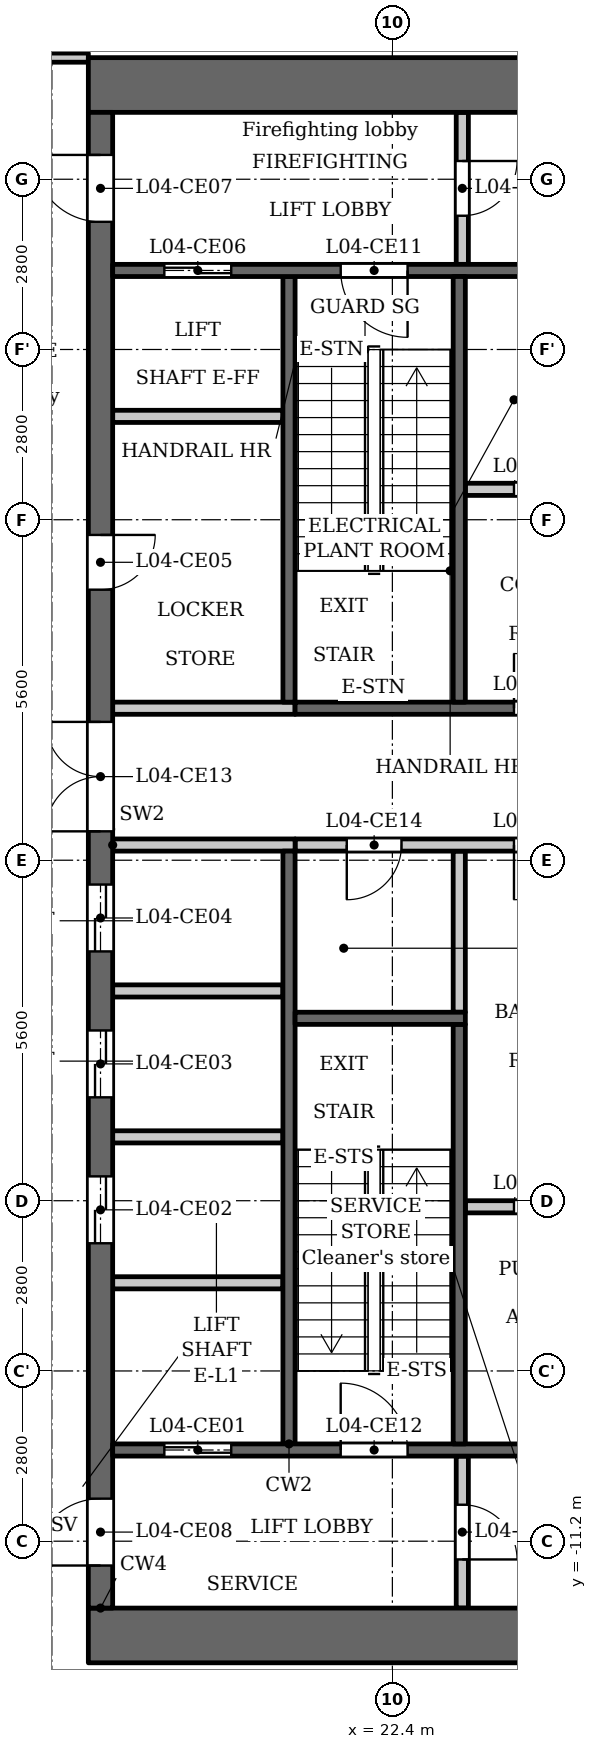
"""IFC4 building model, lengths in metres.
Left out: names, types, materials, properties, quantities, classifications, styles, units other than length and angle.
Written with IfcOpenShell. Run it as: python <this file> out.ifc"""

import sys

from ifc_helpers import new_model, si_unit, direction, frame, frame_2d, origin, place, context, subcontext, project, spatial, rectangle, extrude, element, fill, save


model = new_model("IFC4")
c1 = context("Model", 3, precision=1e-05, world=origin(), true_north=direction((0.0, 1.0)))
c2 = subcontext(c1, "Body", "Model", "MODEL_VIEW")
j1 = project(units=[si_unit("LENGTHUNIT", "METRE"), si_unit("PLANEANGLEUNIT", "RADIAN")], contexts=[c1])
p1 = place(None, origin())
s1 = spatial("IfcSite", under=j1, at=p1, CompositionType="ELEMENT")
p2 = place(p1, origin())
s2 = spatial("IfcBuilding", under=s1, at=p2, CompositionType="ELEMENT")
p3 = place(p2, frame((0.0, 0.0, 20.9)))
s3 = spatial("IfcBuildingStorey", under=s2, at=p3, CompositionType="ELEMENT", Elevation=20.9)
p4 = place(p3, frame((23.5, -2.5, 0.0), z_axis=(0.0, 0.0, 1.0), x_axis=(0.0, 1.0, 0.0)))
e1 = element("IfcWall", 1, at=p4, inside=s3, PredefinedType="PARTITIONING", context=c2, shape_type="SweptSolid", body=[
    extrude(rectangle(XDim=2.65, YDim=0.2, at=frame_2d((1.325, 0.0))), origin(), (0.0, 0.0, 1.0), 4.45),
])
p5 = place(p3, frame((20.7, 2.6, 0.0), z_axis=(0.0, 0.0, 1.0), x_axis=(0.0, 1.0, 0.0)))
e2 = element("IfcWall", 2, at=p5, inside=s3, PredefinedType="SHEAR", context=c2, shape_type="SweptSolid", body=[
    extrude(rectangle(XDim=7.0, YDim=0.2, at=frame_2d((3.5, 0.0))), origin(), (0.0, 0.0, 1.0), 4.45),
])
p6 = place(p3, frame((20.7, -9.6, 0.0), z_axis=(0.0, 0.0, 1.0), x_axis=(0.0, 1.0, 0.0)))
e3 = element("IfcWall", 3, at=p6, inside=s3, PredefinedType="SHEAR", context=c2, shape_type="SweptSolid", body=[
    extrude(rectangle(XDim=9.75, YDim=0.2, at=frame_2d((4.875, 0.0))), origin(), (0.0, 0.0, 1.0), 4.45),
])
p7 = place(p3, frame((20.8, 2.5, 0.0), z_axis=(0.0, 0.0, 1.0), x_axis=(1.0, 0.0, 0.0)))
e4 = element("IfcWall", 4, at=p7, inside=s3, PredefinedType="SHEAR", context=c2, shape_type="SweptSolid", body=[
    extrude(rectangle(XDim=5.3, YDim=0.2, at=frame_2d((2.65, 0.0))), origin(), (0.0, 0.0, 1.0), 4.45),
])
p8 = place(p7, frame((3.6, 0.0, 0.0)))
e5 = element("IfcOpeningElement", 5, at=p8, cuts=e4, PredefinedType="OPENING", context=c2, shape_type="SweptSolid", body=[
    extrude(rectangle(XDim=0.9, YDim=2.1, at=frame_2d((0.45, 1.05))), frame((0.0, 0.11, 0.0), z_axis=(0.0, -1.0, 0.0), x_axis=(1.0, 0.0, 0.0)), (0.0, 0.0, 1.0), 0.22),
])
p9 = place(p3, frame((20.8, 0.25, 0.0), z_axis=(0.0, 0.0, 1.0), x_axis=(1.0, 0.0, 0.0)))
e6 = element("IfcWall", 6, at=p9, inside=s3, PredefinedType="PARTITIONING", context=c2, shape_type="SweptSolid", body=[
    extrude(rectangle(XDim=5.3, YDim=0.2, at=frame_2d((2.65, 0.0))), origin(), (0.0, 0.0, 1.0), 4.45),
])
p10 = place(p9, frame((0.85, 0.0, 0.0)))
e7 = element("IfcOpeningElement", 7, at=p10, cuts=e6, PredefinedType="OPENING", context=c2, shape_type="SweptSolid", body=[
    extrude(rectangle(XDim=0.9, YDim=2.1, at=frame_2d((0.45, 1.05))), frame((0.0, 0.11, 0.0), z_axis=(0.0, -1.0, 0.0), x_axis=(1.0, 0.0, 0.0)), (0.0, 0.0, 1.0), 0.22),
])
p11 = place(p9, frame((3.6, 0.0, 0.0)))
e8 = element("IfcOpeningElement", 8, at=p11, cuts=e6, PredefinedType="OPENING", context=c2, shape_type="SweptSolid", body=[
    extrude(rectangle(XDim=0.9, YDim=2.1, at=frame_2d((0.45, 1.05))), frame((0.0, 0.11, 0.0), z_axis=(0.0, -1.0, 0.0), x_axis=(1.0, 0.0, 0.0)), (0.0, 0.0, 1.0), 0.22),
])
for number, where, z_axis, x_axis in (
    (9, (17.4, 12.75, 0.0), (0.0, 0.0, 1.0), (1.0, 0.0, 0.0)),
    (10, (17.4, -12.75, 0.0), (0.0, 0.0, 1.0), (1.0, 0.0, 0.0)),
):
    element("IfcWall", number, at=place(p3, frame(where, z_axis=z_axis, x_axis=x_axis)), inside=s3, PredefinedType="SHEAR", context=c2, shape_type="SweptSolid", body=[
        extrude(rectangle(XDim=10.4, YDim=0.9, at=frame_2d((5.2, 0.0))), origin(), (0.0, 0.0, 1.0), 4.45),
    ])
p12 = place(p3, frame((17.6, -12.3, 0.0), z_axis=(0.0, 0.0, 1.0), x_axis=(0.0, 1.0, 0.0)))
e11 = element("IfcWall", 11, at=p12, inside=s3, PredefinedType="SHEAR", context=c2, shape_type="SweptSolid", body=[
    extrude(rectangle(XDim=24.6, YDim=0.4, at=frame_2d((12.3, 0.0))), origin(), (0.0, 0.0, 1.0), 4.45),
])
p13 = place(p12, frame((6.0, 0.0, 0.0)))
e12 = element("IfcOpeningElement", 12, at=p13, cuts=e11, PredefinedType="OPENING", context=c2, shape_type="SweptSolid", body=[
    extrude(rectangle(XDim=1.1, YDim=2.1, at=frame_2d((0.55, 1.05))), frame((0.0, 0.21, 0.0), z_axis=(0.0, -1.0, 0.0), x_axis=(1.0, 0.0, 0.0)), (0.0, 0.0, 1.0), 0.42),
])
p14 = place(p12, frame((8.4, 0.0, 0.0)))
e13 = element("IfcOpeningElement", 13, at=p14, cuts=e11, PredefinedType="OPENING", context=c2, shape_type="SweptSolid", body=[
    extrude(rectangle(XDim=1.1, YDim=2.1, at=frame_2d((0.55, 1.05))), frame((0.0, 0.21, 0.0), z_axis=(0.0, -1.0, 0.0), x_axis=(1.0, 0.0, 0.0)), (0.0, 0.0, 1.0), 0.42),
])
p15 = place(p12, frame((10.8, 0.0, 0.0)))
e14 = element("IfcOpeningElement", 14, at=p15, cuts=e11, PredefinedType="OPENING", context=c2, shape_type="SweptSolid", body=[
    extrude(rectangle(XDim=1.1, YDim=2.1, at=frame_2d((0.55, 1.05))), frame((0.0, 0.21, 0.0), z_axis=(0.0, -1.0, 0.0), x_axis=(1.0, 0.0, 0.0)), (0.0, 0.0, 1.0), 0.42),
])
p16 = place(p12, frame((16.75, 0.0, 0.0)))
e15 = element("IfcOpeningElement", 15, at=p16, cuts=e11, PredefinedType="OPENING", context=c2, shape_type="SweptSolid", body=[
    extrude(rectangle(XDim=0.9, YDim=2.1, at=frame_2d((0.45, 1.05))), frame((0.0, 0.21, 0.0), z_axis=(0.0, -1.0, 0.0), x_axis=(1.0, 0.0, 0.0)), (0.0, 0.0, 1.0), 0.42),
])
p17 = place(p12, frame((22.8, 0.0, 0.0)))
e16 = element("IfcOpeningElement", 16, at=p17, cuts=e11, PredefinedType="OPENING", context=c2, shape_type="SweptSolid", body=[
    extrude(rectangle(XDim=1.1, YDim=2.1, at=frame_2d((0.55, 1.05))), frame((0.0, 0.21, 0.0), z_axis=(0.0, -1.0, 0.0), x_axis=(1.0, 0.0, 0.0)), (0.0, 0.0, 1.0), 0.42),
])
p18 = place(p12, frame((0.7, 0.0, 0.0)))
e17 = element("IfcOpeningElement", 17, at=p18, cuts=e11, PredefinedType="OPENING", context=c2, shape_type="SweptSolid", body=[
    extrude(rectangle(XDim=1.1, YDim=2.1, at=frame_2d((0.55, 1.05))), frame((0.0, 0.21, 0.0), z_axis=(0.0, -1.0, 0.0), x_axis=(1.0, 0.0, 0.0)), (0.0, 0.0, 1.0), 0.42),
])
p19 = place(p12, frame((12.775, 0.0, 0.0)))
e18 = element("IfcOpeningElement", 18, at=p19, cuts=e11, PredefinedType="OPENING", context=c2, shape_type="SweptSolid", body=[
    extrude(rectangle(XDim=1.8, YDim=2.1, at=frame_2d((0.9, 1.05))), frame((0.0, 0.21, 0.0), z_axis=(0.0, -1.0, 0.0), x_axis=(1.0, 0.0, 0.0)), (0.0, 0.0, 1.0), 0.42),
])
p20 = place(p3, frame((23.55, 9.8, 0.0), z_axis=(0.0, 0.0, 1.0), x_axis=(0.0, 1.0, 0.0)))
e19 = element("IfcWall", 19, at=p20, inside=s3, PredefinedType="PARTITIONING", context=c2, shape_type="SweptSolid", body=[
    extrude(rectangle(XDim=2.5, YDim=0.2, at=frame_2d((1.25, 0.0))), origin(), (0.0, 0.0, 1.0), 4.45),
])
p21 = place(p20, frame((0.8, 0.0, 0.0)))
e20 = element("IfcOpeningElement", 20, at=p21, cuts=e19, PredefinedType="OPENING", context=c2, shape_type="SweptSolid", body=[
    extrude(rectangle(XDim=0.9, YDim=2.1, at=frame_2d((0.45, 1.05))), frame((0.0, 0.11, 0.0), z_axis=(0.0, -1.0, 0.0), x_axis=(1.0, 0.0, 0.0)), (0.0, 0.0, 1.0), 0.22),
])
p22 = place(p3, frame((23.55, -12.3, 0.0), z_axis=(0.0, 0.0, 1.0), x_axis=(0.0, 1.0, 0.0)))
e21 = element("IfcWall", 21, at=p22, inside=s3, PredefinedType="PARTITIONING", context=c2, shape_type="SweptSolid", body=[
    extrude(rectangle(XDim=2.5, YDim=0.2, at=frame_2d((1.25, 0.0))), origin(), (0.0, 0.0, 1.0), 4.45),
])
p23 = place(p22, frame((0.8, 0.0, 0.0)))
e22 = element("IfcOpeningElement", 22, at=p23, cuts=e21, PredefinedType="OPENING", context=c2, shape_type="SweptSolid", body=[
    extrude(rectangle(XDim=0.9, YDim=2.1, at=frame_2d((0.45, 1.05))), frame((0.0, 0.11, 0.0), z_axis=(0.0, -1.0, 0.0), x_axis=(1.0, 0.0, 0.0)), (0.0, 0.0, 1.0), 0.22),
])
p24 = place(p3, frame((23.6, -5.7, 0.0), z_axis=(0.0, 0.0, 1.0), x_axis=(1.0, 0.0, 0.0)))
e23 = element("IfcWall", 23, at=p24, inside=s3, PredefinedType="PARTITIONING", context=c2, shape_type="SweptSolid", body=[
    extrude(rectangle(XDim=2.5, YDim=0.2, at=frame_2d((1.25, 0.0))), origin(), (0.0, 0.0, 1.0), 4.45),
])
p25 = place(p24, frame((0.8, 0.0, 0.0)))
e24 = element("IfcOpeningElement", 24, at=p25, cuts=e23, PredefinedType="OPENING", context=c2, shape_type="SweptSolid", body=[
    extrude(rectangle(XDim=0.9, YDim=2.1, at=frame_2d((0.45, 1.05))), frame((0.0, 0.11, 0.0), z_axis=(0.0, -1.0, 0.0), x_axis=(1.0, 0.0, 0.0)), (0.0, 0.0, 1.0), 0.22),
])
p26 = place(p3, frame((23.6, 6.1, 0.0), z_axis=(0.0, 0.0, 1.0), x_axis=(1.0, 0.0, 0.0)))
e25 = element("IfcWall", 25, at=p26, inside=s3, PredefinedType="PARTITIONING", context=c2, shape_type="SweptSolid", body=[
    extrude(rectangle(XDim=2.5, YDim=0.2, at=frame_2d((1.25, 0.0))), origin(), (0.0, 0.0, 1.0), 4.45),
])
p27 = place(p26, frame((0.8, 0.0, 0.0)))
e26 = element("IfcOpeningElement", 26, at=p27, cuts=e25, PredefinedType="OPENING", context=c2, shape_type="SweptSolid", body=[
    extrude(rectangle(XDim=0.9, YDim=2.1, at=frame_2d((0.45, 1.05))), frame((0.0, 0.11, 0.0), z_axis=(0.0, -1.0, 0.0), x_axis=(1.0, 0.0, 0.0)), (0.0, 0.0, 1.0), 0.22),
])
p28 = place(p3, frame((17.8, -9.7, 0.0), z_axis=(0.0, 0.0, 1.0), x_axis=(1.0, 0.0, 0.0)))
e27 = element("IfcWall", 27, at=p28, inside=s3, PredefinedType="SHEAR", context=c2, shape_type="SweptSolid", body=[
    extrude(rectangle(XDim=8.3, YDim=0.2, at=frame_2d((4.15, 0.0))), origin(), (0.0, 0.0, 1.0), 4.45),
])
p29 = place(p28, frame((0.85, 0.0, 0.0)))
e28 = element("IfcOpeningElement", 28, at=p29, cuts=e27, PredefinedType="OPENING", context=c2, shape_type="SweptSolid", body=[
    extrude(rectangle(XDim=1.1, YDim=2.1, at=frame_2d((0.55, 1.05))), frame((0.0, 0.11, 0.0), z_axis=(0.0, -1.0, 0.0), x_axis=(1.0, 0.0, 0.0)), (0.0, 0.0, 1.0), 0.22),
])
p30 = place(p28, frame((3.75, 0.0, 0.0)))
e29 = element("IfcOpeningElement", 29, at=p30, cuts=e27, PredefinedType="OPENING", context=c2, shape_type="SweptSolid", body=[
    extrude(rectangle(XDim=1.1, YDim=2.1, at=frame_2d((0.55, 1.05))), frame((0.0, 0.11, 0.0), z_axis=(0.0, -1.0, 0.0), x_axis=(1.0, 0.0, 0.0)), (0.0, 0.0, 1.0), 0.22),
])
for number, where, z_axis, x_axis in (
    (30, (17.8, -6.95, 0.0), (0.0, 0.0, 1.0), (1.0, 0.0, 0.0)),
    (31, (17.8, -4.55, 0.0), (0.0, 0.0, 1.0), (1.0, 0.0, 0.0)),
    (32, (17.8, -2.15, 0.0), (0.0, 0.0, 1.0), (1.0, 0.0, 0.0)),
):
    element("IfcWall", number, at=place(p3, frame(where, z_axis=z_axis, x_axis=x_axis)), inside=s3, PredefinedType="PARTITIONING", context=c2, shape_type="SweptSolid", body=[
        extrude(rectangle(XDim=2.8, YDim=0.2, at=frame_2d((1.4, 0.0))), origin(), (0.0, 0.0, 1.0), 4.45),
    ])
for number, where, z_axis, x_axis in (
    (33, (17.8, 0.25, 0.0), (0.0, 0.0, 1.0), (1.0, 0.0, 0.0)),
    (34, (17.8, 2.5, 0.0), (0.0, 0.0, 1.0), (1.0, 0.0, 0.0)),
):
    element("IfcWall", number, at=place(p3, frame(where, z_axis=z_axis, x_axis=x_axis)), inside=s3, PredefinedType="PARTITIONING", context=c2, shape_type="SweptSolid", body=[
        extrude(rectangle(XDim=3.0, YDim=0.2, at=frame_2d((1.5, 0.0))), origin(), (0.0, 0.0, 1.0), 4.45),
    ])
p31 = place(p3, frame((17.8, 7.3, 0.0), z_axis=(0.0, 0.0, 1.0), x_axis=(1.0, 0.0, 0.0)))
e35 = element("IfcWall", 35, at=p31, inside=s3, PredefinedType="PARTITIONING", context=c2, shape_type="SweptSolid", body=[
    extrude(rectangle(XDim=2.8, YDim=0.2, at=frame_2d((1.4, 0.0))), origin(), (0.0, 0.0, 1.0), 4.45),
])
p32 = place(p3, frame((17.8, 9.7, 0.0), z_axis=(0.0, 0.0, 1.0), x_axis=(1.0, 0.0, 0.0)))
e36 = element("IfcWall", 36, at=p32, inside=s3, PredefinedType="SHEAR", context=c2, shape_type="SweptSolid", body=[
    extrude(rectangle(XDim=8.3, YDim=0.2, at=frame_2d((4.15, 0.0))), origin(), (0.0, 0.0, 1.0), 4.45),
])
p33 = place(p32, frame((0.85, 0.0, 0.0)))
e37 = element("IfcOpeningElement", 37, at=p33, cuts=e36, PredefinedType="OPENING", context=c2, shape_type="SweptSolid", body=[
    extrude(rectangle(XDim=1.1, YDim=2.1, at=frame_2d((0.55, 1.05))), frame((0.0, 0.11, 0.0), z_axis=(0.0, -1.0, 0.0), x_axis=(1.0, 0.0, 0.0)), (0.0, 0.0, 1.0), 0.22),
])
p34 = place(p32, frame((3.75, 0.0, 0.0)))
e38 = element("IfcOpeningElement", 38, at=p34, cuts=e36, PredefinedType="OPENING", context=c2, shape_type="SweptSolid", body=[
    extrude(rectangle(XDim=1.1, YDim=2.1, at=frame_2d((0.55, 1.05))), frame((0.0, 0.11, 0.0), z_axis=(0.0, -1.0, 0.0), x_axis=(1.0, 0.0, 0.0)), (0.0, 0.0, 1.0), 0.22),
])
p35 = place(p3, frame((23.5, 2.6, 0.0), z_axis=(0.0, 0.0, 1.0), x_axis=(0.0, 1.0, 0.0)))
e39 = element("IfcWall", 39, at=p35, inside=s3, PredefinedType="SHEAR", context=c2, shape_type="SweptSolid", body=[
    extrude(rectangle(XDim=7.0, YDim=0.2, at=frame_2d((3.5, 0.0))), origin(), (0.0, 0.0, 1.0), 4.45),
])
p36 = place(p3, frame((23.5, -9.6, 0.0), z_axis=(0.0, 0.0, 1.0), x_axis=(0.0, 1.0, 0.0)))
e40 = element("IfcWall", 40, at=p36, inside=s3, PredefinedType="SHEAR", context=c2, shape_type="SweptSolid", body=[
    extrude(rectangle(XDim=6.9, YDim=0.2, at=frame_2d((3.45, 0.0))), origin(), (0.0, 0.0, 1.0), 4.45),
])
p37 = place(p3, frame((20.8, -2.6, 0.0), z_axis=(0.0, 0.0, 1.0), x_axis=(1.0, 0.0, 0.0)))
e41 = element("IfcWall", 41, at=p37, inside=s3, PredefinedType="SHEAR", context=c2, shape_type="SweptSolid", body=[
    extrude(rectangle(XDim=2.8, YDim=0.2, at=frame_2d((1.4, 0.0))), origin(), (0.0, 0.0, 1.0), 4.45),
])
p38 = place(p3, frame((-17.4, 13.2, 0.0), z_axis=(0.0, 0.0, 1.0), x_axis=(1.0, 0.0, 0.0)))
e42 = element("IfcWall", 42, at=p38, inside=s3, PredefinedType="PARTITIONING", context=c2, shape_type="SweptSolid", body=[
    extrude(rectangle(XDim=34.8, YDim=0.15, at=frame_2d((17.4, 0.0))), origin(), (0.0, 0.0, 1.0), 4.45),
])
p39 = place(p38, frame((3.05, 0.0, 0.0)))
e43 = element("IfcOpeningElement", 43, at=p39, cuts=e42, PredefinedType="OPENING", context=c2, shape_type="SweptSolid", body=[
    extrude(rectangle(XDim=1.8, YDim=2.1, at=frame_2d((0.9, 1.05))), frame((0.0, 0.085, 0.0), z_axis=(0.0, -1.0, 0.0), x_axis=(1.0, 0.0, 0.0)), (0.0, 0.0, 1.0), 0.17),
])
p40 = place(p38, frame((0.75, 0.0, 0.0)))
e44 = element("IfcOpeningElement", 44, at=p40, cuts=e42, PredefinedType="OPENING", context=c2, shape_type="SweptSolid", body=[
    extrude(rectangle(XDim=1.0, YDim=2.1, at=frame_2d((0.5, 1.05))), frame((0.0, 0.085, 0.0), z_axis=(0.0, -1.0, 0.0), x_axis=(1.0, 0.0, 0.0)), (0.0, 0.0, 1.0), 0.17),
])
p41 = place(p38, frame((33.15, 0.0, 0.0)))
e45 = element("IfcOpeningElement", 45, at=p41, cuts=e42, PredefinedType="OPENING", context=c2, shape_type="SweptSolid", body=[
    extrude(rectangle(XDim=1.0, YDim=2.1, at=frame_2d((0.5, 1.05))), frame((0.0, 0.085, 0.0), z_axis=(0.0, -1.0, 0.0), x_axis=(1.0, 0.0, 0.0)), (0.0, 0.0, 1.0), 0.17),
])
p42 = place(p29, origin())
e46 = element("IfcDoor", 46, at=p42, inside=s3, OperationType="DOUBLE_DOOR_SLIDING", PredefinedType="DOOR", context=c2, shape_type="SweptSolid", body=[
    extrude(rectangle(XDim=1.1, YDim=2.1, at=frame_2d((0.55, 1.05))), frame((0.0, 0.025, 0.0), z_axis=(0.0, -1.0, 0.0), x_axis=(1.0, 0.0, 0.0)), (0.0, 0.0, 1.0), 0.05),
])
fill(e28, e46)
p43 = place(p13, origin())
e47 = element("IfcDoor", 47, at=p43, inside=s3, OperationType="DOUBLE_DOOR_SLIDING", PredefinedType="DOOR", context=c2, shape_type="SweptSolid", body=[
    extrude(rectangle(XDim=1.1, YDim=2.1, at=frame_2d((0.55, 1.05))), frame((0.0, 0.025, 0.0), z_axis=(0.0, -1.0, 0.0), x_axis=(1.0, 0.0, 0.0)), (0.0, 0.0, 1.0), 0.05),
])
fill(e12, e47)
p44 = place(p14, origin())
e48 = element("IfcDoor", 48, at=p44, inside=s3, OperationType="DOUBLE_DOOR_SLIDING", PredefinedType="DOOR", context=c2, shape_type="SweptSolid", body=[
    extrude(rectangle(XDim=1.1, YDim=2.1, at=frame_2d((0.55, 1.05))), frame((0.0, 0.025, 0.0), z_axis=(0.0, -1.0, 0.0), x_axis=(1.0, 0.0, 0.0)), (0.0, 0.0, 1.0), 0.05),
])
fill(e13, e48)
p45 = place(p15, origin())
e49 = element("IfcDoor", 49, at=p45, inside=s3, OperationType="DOUBLE_DOOR_SLIDING", PredefinedType="DOOR", context=c2, shape_type="SweptSolid", body=[
    extrude(rectangle(XDim=1.1, YDim=2.1, at=frame_2d((0.55, 1.05))), frame((0.0, 0.025, 0.0), z_axis=(0.0, -1.0, 0.0), x_axis=(1.0, 0.0, 0.0)), (0.0, 0.0, 1.0), 0.05),
])
fill(e14, e49)
p46 = place(p16, origin())
e50 = element("IfcDoor", 50, at=p46, inside=s3, OperationType="SINGLE_SWING_RIGHT", PredefinedType="DOOR", context=c2, shape_type="SweptSolid", body=[
    extrude(rectangle(XDim=0.9, YDim=2.1, at=frame_2d((0.45, 1.05))), frame((0.0, 0.025, 0.0), z_axis=(0.0, -1.0, 0.0), x_axis=(1.0, 0.0, 0.0)), (0.0, 0.0, 1.0), 0.05),
])
fill(e15, e50)
p47 = place(p33, origin())
e51 = element("IfcDoor", 51, at=p47, inside=s3, OperationType="DOUBLE_DOOR_SLIDING", PredefinedType="DOOR", context=c2, shape_type="SweptSolid", body=[
    extrude(rectangle(XDim=1.1, YDim=2.1, at=frame_2d((0.55, 1.05))), frame((0.0, 0.025, 0.0), z_axis=(0.0, -1.0, 0.0), x_axis=(1.0, 0.0, 0.0)), (0.0, 0.0, 1.0), 0.05),
])
fill(e37, e51)
p48 = place(p17, origin())
e52 = element("IfcDoor", 52, at=p48, inside=s3, OperationType="SINGLE_SWING_LEFT", PredefinedType="DOOR", context=c2, shape_type="SweptSolid", body=[
    extrude(rectangle(XDim=1.1, YDim=2.1, at=frame_2d((0.55, 1.05))), frame((0.0, 0.025, 0.0), z_axis=(0.0, -1.0, 0.0), x_axis=(1.0, 0.0, 0.0)), (0.0, 0.0, 1.0), 0.05),
])
fill(e16, e52)
p49 = place(p18, origin())
e53 = element("IfcDoor", 53, at=p49, inside=s3, OperationType="SINGLE_SWING_RIGHT", PredefinedType="DOOR", context=c2, shape_type="SweptSolid", body=[
    extrude(rectangle(XDim=1.1, YDim=2.1, at=frame_2d((0.55, 1.05))), frame((0.0, 0.025, 0.0), z_axis=(0.0, -1.0, 0.0), x_axis=(1.0, 0.0, 0.0)), (0.0, 0.0, 1.0), 0.05),
])
fill(e17, e53)
p50 = place(p21, origin())
e54 = element("IfcDoor", 54, at=p50, inside=s3, OperationType="SINGLE_SWING_RIGHT", PredefinedType="DOOR", context=c2, shape_type="SweptSolid", body=[
    extrude(rectangle(XDim=0.9, YDim=2.1, at=frame_2d((0.45, 1.05))), frame((0.0, 0.025, 0.0), z_axis=(0.0, -1.0, 0.0), x_axis=(1.0, 0.0, 0.0)), (0.0, 0.0, 1.0), 0.05),
])
fill(e20, e54)
p51 = place(p23, origin())
e55 = element("IfcDoor", 55, at=p51, inside=s3, OperationType="SINGLE_SWING_LEFT", PredefinedType="DOOR", context=c2, shape_type="SweptSolid", body=[
    extrude(rectangle(XDim=0.9, YDim=2.1, at=frame_2d((0.45, 1.05))), frame((0.0, 0.025, 0.0), z_axis=(0.0, -1.0, 0.0), x_axis=(1.0, 0.0, 0.0)), (0.0, 0.0, 1.0), 0.05),
])
fill(e22, e55)
p52 = place(p34, origin())
e56 = element("IfcDoor", 56, at=p52, inside=s3, OperationType="SINGLE_SWING_RIGHT", PredefinedType="DOOR", context=c2, shape_type="SweptSolid", body=[
    extrude(rectangle(XDim=1.1, YDim=2.1, at=frame_2d((0.55, 1.05))), frame((0.0, 0.025, 0.0), z_axis=(0.0, -1.0, 0.0), x_axis=(1.0, 0.0, 0.0)), (0.0, 0.0, 1.0), 0.05),
])
fill(e38, e56)
p53 = place(p30, origin())
e57 = element("IfcDoor", 57, at=p53, inside=s3, OperationType="SINGLE_SWING_RIGHT", PredefinedType="DOOR", context=c2, shape_type="SweptSolid", body=[
    extrude(rectangle(XDim=1.1, YDim=2.1, at=frame_2d((0.55, 1.05))), frame((0.0, 0.025, 0.0), z_axis=(0.0, -1.0, 0.0), x_axis=(1.0, 0.0, 0.0)), (0.0, 0.0, 1.0), 0.05),
])
fill(e29, e57)
p54 = place(p19, origin())
e58 = element("IfcDoor", 58, at=p54, inside=s3, OperationType="DOUBLE_DOOR_SINGLE_SWING", PredefinedType="DOOR", context=c2, shape_type="SweptSolid", body=[
    extrude(rectangle(XDim=1.8, YDim=2.1, at=frame_2d((0.9, 1.05))), frame((0.0, 0.025, 0.0), z_axis=(0.0, -1.0, 0.0), x_axis=(1.0, 0.0, 0.0)), (0.0, 0.0, 1.0), 0.05),
])
fill(e18, e58)
p55 = place(p10, origin())
e59 = element("IfcDoor", 59, at=p55, inside=s3, OperationType="SINGLE_SWING_LEFT", PredefinedType="DOOR", context=c2, shape_type="SweptSolid", body=[
    extrude(rectangle(XDim=0.9, YDim=2.1, at=frame_2d((0.45, 1.05))), frame((0.0, 0.025, 0.0), z_axis=(0.0, -1.0, 0.0), x_axis=(1.0, 0.0, 0.0)), (0.0, 0.0, 1.0), 0.05),
])
fill(e7, e59)
p56 = place(p25, origin())
e60 = element("IfcDoor", 60, at=p56, inside=s3, OperationType="SINGLE_SWING_LEFT", PredefinedType="DOOR", context=c2, shape_type="SweptSolid", body=[
    extrude(rectangle(XDim=0.9, YDim=2.1, at=frame_2d((0.45, 1.05))), frame((0.0, 0.025, 0.0), z_axis=(0.0, -1.0, 0.0), x_axis=(1.0, 0.0, 0.0)), (0.0, 0.0, 1.0), 0.05),
])
fill(e24, e60)
p57 = place(p11, origin())
e61 = element("IfcDoor", 61, at=p57, inside=s3, OperationType="SINGLE_SWING_LEFT", PredefinedType="DOOR", context=c2, shape_type="SweptSolid", body=[
    extrude(rectangle(XDim=0.9, YDim=2.1, at=frame_2d((0.45, 1.05))), frame((0.0, 0.025, 0.0), z_axis=(0.0, -1.0, 0.0), x_axis=(1.0, 0.0, 0.0)), (0.0, 0.0, 1.0), 0.05),
])
fill(e8, e61)
p58 = place(p27, origin())
e62 = element("IfcDoor", 62, at=p58, inside=s3, OperationType="SINGLE_SWING_LEFT", PredefinedType="DOOR", context=c2, shape_type="SweptSolid", body=[
    extrude(rectangle(XDim=0.9, YDim=2.1, at=frame_2d((0.45, 1.05))), frame((0.0, 0.025, 0.0), z_axis=(0.0, -1.0, 0.0), x_axis=(1.0, 0.0, 0.0)), (0.0, 0.0, 1.0), 0.05),
])
fill(e26, e62)
p59 = place(p8, origin())
e63 = element("IfcDoor", 63, at=p59, inside=s3, OperationType="SINGLE_SWING_RIGHT", PredefinedType="DOOR", context=c2, shape_type="SweptSolid", body=[
    extrude(rectangle(XDim=0.9, YDim=2.1, at=frame_2d((0.45, 1.05))), frame((0.0, 0.025, 0.0), z_axis=(0.0, -1.0, 0.0), x_axis=(1.0, 0.0, 0.0)), (0.0, 0.0, 1.0), 0.05),
])
fill(e5, e63)
save(model, sys.argv[1])
